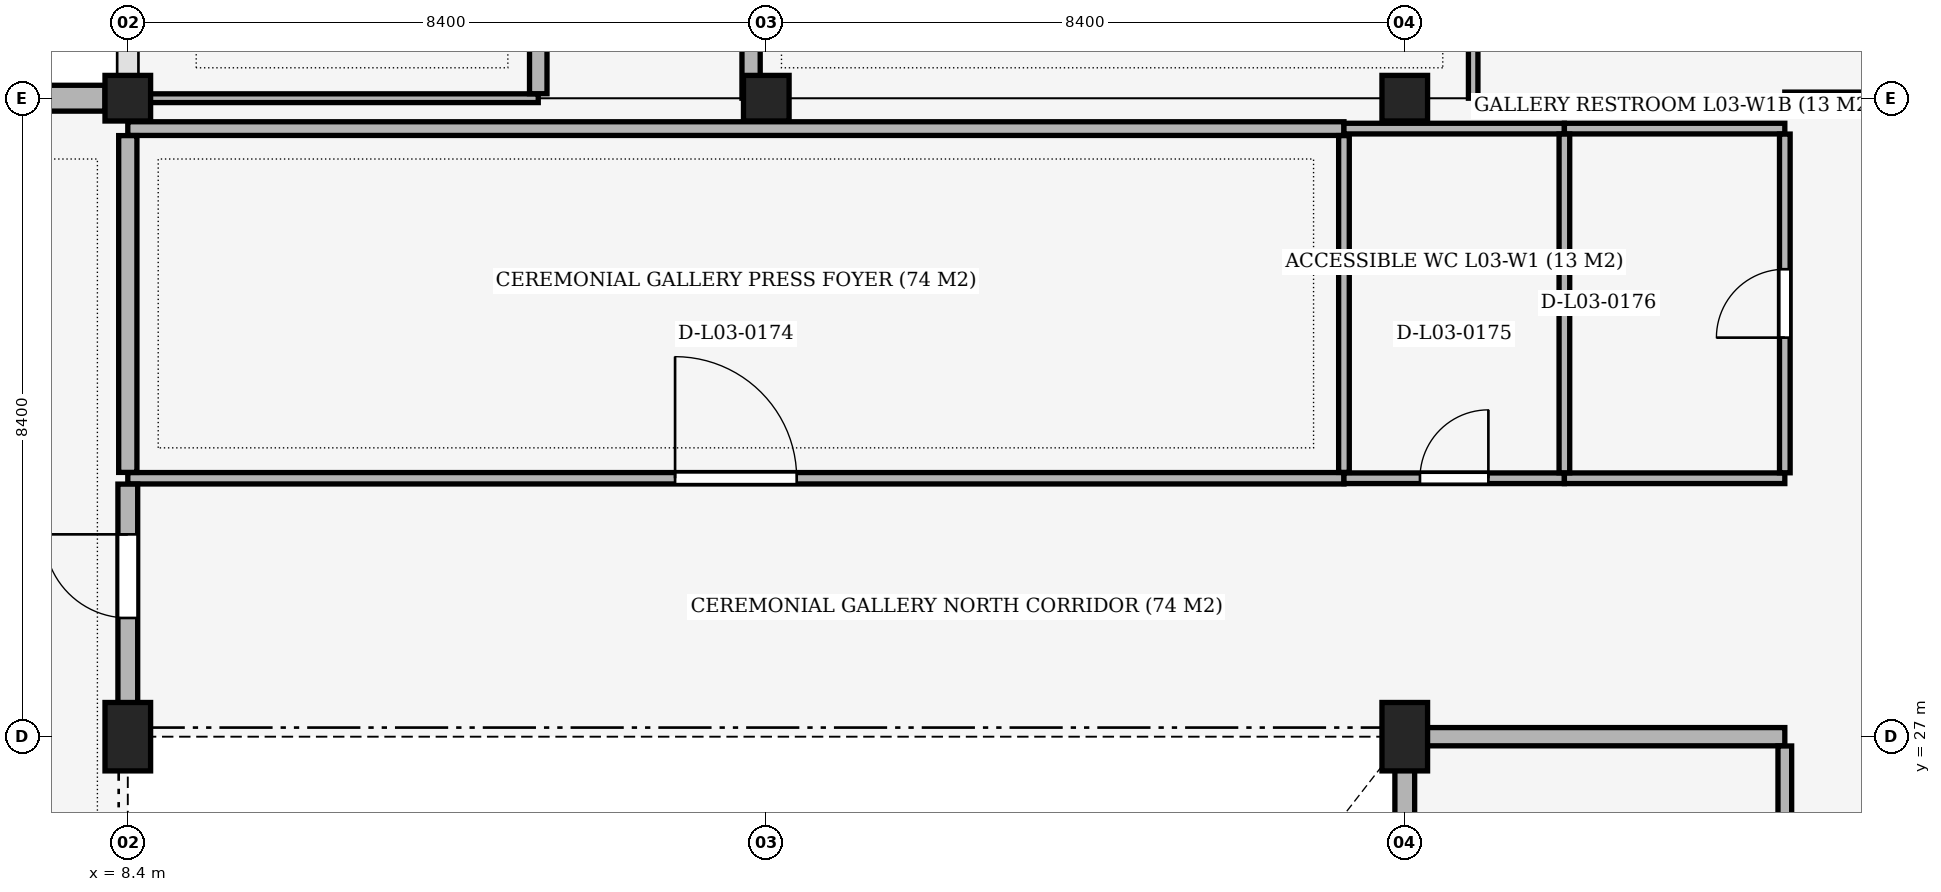
"""IFC4 building model, lengths in metres.
Left out: names, types, materials, properties, quantities, classifications, styles, units other than length and angle.
Written with IfcOpenShell. Run it as: python <this file> out.ifc"""

import sys

from ifc_helpers import new_model, si_unit, direction, frame, frame_2d, origin, origin_2d, place, context, subcontext, project, spatial, rectangle, extrude, element, fill, save


model = new_model("IFC4")
c1 = context("Model", 3, precision=1e-05, world=origin(), true_north=direction((0.0, 1.0)))
c2 = subcontext(c1, "Body", "Model", "MODEL_VIEW")
j1 = project(units=[si_unit("LENGTHUNIT", "METRE"), si_unit("PLANEANGLEUNIT", "RADIAN")], contexts=[c1])
p1 = place(None, origin())
s1 = spatial("IfcSite", under=j1, at=p1, CompositionType="ELEMENT")
p2 = place(p1, origin())
s2 = spatial("IfcBuilding", under=s1, at=p2, CompositionType="ELEMENT")
p3 = place(p2, frame((0.0, 0.0, 15.3)))
s3 = spatial("IfcBuildingStorey", under=s2, at=p3, CompositionType="ELEMENT", Elevation=15.3)
p4 = place(p3, frame((8.4, 27.0, 0.0), z_axis=(0.0, 0.0, 1.0), x_axis=(1.0, 0.0, 0.0)))
e1 = element("IfcColumn", 1, at=p4, inside=s3, PredefinedType="COLUMN", context=c2, shape_type="SweptSolid", body=[
    extrude(rectangle(XDim=0.6, YDim=0.9, at=origin_2d()), origin(), (0.0, 0.0, 1.0), 5.1),
])
for number, where, z_axis, x_axis in (
    (2, (8.4, 35.4, 0.0), (0.0, 0.0, 1.0), (1.0, 0.0, 0.0)),
    (3, (16.8, 35.4, 0.0), (0.0, 0.0, 1.0), (1.0, 0.0, 0.0)),
):
    element("IfcColumn", number, at=place(p3, frame(where, z_axis=z_axis, x_axis=x_axis)), inside=s3, PredefinedType="COLUMN", context=c2, shape_type="SweptSolid", body=[
        extrude(rectangle(XDim=0.6, YDim=0.6, at=origin_2d()), origin(), (0.0, 0.0, 1.0), 5.1),
    ])
p5 = place(p3, frame((25.2, 27.0, 0.0), z_axis=(0.0, 0.0, 1.0), x_axis=(1.0, 0.0, 0.0)))
e4 = element("IfcColumn", 4, at=p5, inside=s3, PredefinedType="COLUMN", context=c2, shape_type="SweptSolid", body=[
    extrude(rectangle(XDim=0.6, YDim=0.9, at=origin_2d()), origin(), (0.0, 0.0, 1.0), 5.1),
])
p6 = place(p3, frame((25.2, 35.4, 0.0), z_axis=(0.0, 0.0, 1.0), x_axis=(1.0, 0.0, 0.0)))
e5 = element("IfcColumn", 5, at=p6, inside=s3, PredefinedType="COLUMN", context=c2, shape_type="SweptSolid", body=[
    extrude(rectangle(XDim=0.6, YDim=0.6, at=origin_2d()), origin(), (0.0, 0.0, 1.0), 5.1),
])
p7 = place(p3, frame((0.3, 35.4, 0.0), z_axis=(0.0, 0.0, 1.0), x_axis=(1.0, 0.0, 0.0)))
e6 = element("IfcWall", 6, at=p7, inside=s3, PredefinedType="SOLIDWALL", context=c2, shape_type="SweptSolid", body=[
    extrude(rectangle(XDim=7.8, YDim=0.34, at=frame_2d((3.9, 0.0))), origin(), (0.0, 0.0, 1.0), 4.14),
])
p8 = place(p7, frame((0.733, 0.0, 0.75)))
e7 = element("IfcOpeningElement", 7, at=p8, cuts=e6, PredefinedType="OPENING", context=c2, shape_type="SweptSolid", body=[
    extrude(rectangle(XDim=2.8, YDim=2.6, at=frame_2d((1.4, 1.3))), frame((0.0, 0.185, 0.0), z_axis=(0.0, -1.0, 0.0), x_axis=(1.0, 0.0, 0.0)), (0.0, 0.0, 1.0), 0.37),
])
p9 = place(p7, frame((4.267, 0.0, 0.75)))
e8 = element("IfcOpeningElement", 8, at=p9, cuts=e6, PredefinedType="OPENING", context=c2, shape_type="SweptSolid", body=[
    extrude(rectangle(XDim=2.8, YDim=2.6, at=frame_2d((1.4, 1.3))), frame((0.0, 0.185, 0.0), z_axis=(0.0, -1.0, 0.0), x_axis=(1.0, 0.0, 0.0)), (0.0, 0.0, 1.0), 0.37),
])
p10 = place(p3, frame((25.2, 27.0, 0.0), z_axis=(0.0, 0.0, 1.0), x_axis=(1.0, 0.0, 0.0)))
e9 = element("IfcWall", 9, at=p10, inside=s3, PredefinedType="PARTITIONING", context=c2, shape_type="SweptSolid", body=[
    extrude(rectangle(XDim=5.0, YDim=0.24, at=frame_2d((2.5, 0.0))), origin(), (0.0, 0.0, 1.0), 3.59),
])
p11 = place(p3, frame((8.4, 30.4, 0.0), z_axis=(0.0, 0.0, 1.0), x_axis=(1.0, 0.0, 0.0)))
e10 = element("IfcWall", 10, at=p11, inside=s3, PredefinedType="PARTITIONING", context=c2, shape_type="SweptSolid", body=[
    extrude(rectangle(XDim=16.0, YDim=0.15, at=frame_2d((8.0, 0.0))), origin(), (0.0, 0.0, 1.0), 4.14),
])
p12 = place(p11, frame((7.2, 0.0, 0.0)))
e11 = element("IfcOpeningElement", 11, at=p12, cuts=e10, PredefinedType="OPENING", context=c2, shape_type="SweptSolid", body=[
    extrude(rectangle(XDim=1.6, YDim=2.3, at=frame_2d((0.8, 1.15))), frame((0.0, 0.09, 0.0), z_axis=(0.0, -1.0, 0.0), x_axis=(1.0, 0.0, 0.0)), (0.0, 0.0, 1.0), 0.18),
])
p13 = place(p3, frame((24.4, 30.4, 0.0), z_axis=(0.0, 0.0, 1.0), x_axis=(1.0, 0.0, 0.0)))
e12 = element("IfcWall", 12, at=p13, inside=s3, PredefinedType="PARTITIONING", context=c2, shape_type="SweptSolid", body=[
    extrude(rectangle(XDim=2.9, YDim=0.14, at=frame_2d((1.45, 0.0))), origin(), (0.0, 0.0, 1.0), 4.14),
])
p14 = place(p13, frame((1.0, 0.0, 0.0)))
e13 = element("IfcOpeningElement", 13, at=p14, cuts=e12, PredefinedType="OPENING", context=c2, shape_type="SweptSolid", body=[
    extrude(rectangle(XDim=0.9, YDim=2.1, at=frame_2d((0.45, 1.05))), frame((0.0, 0.085, 0.0), z_axis=(0.0, -1.0, 0.0), x_axis=(1.0, 0.0, 0.0)), (0.0, 0.0, 1.0), 0.17),
])
p15 = place(p3, frame((27.3, 30.4, 0.0), z_axis=(0.0, 0.0, 1.0), x_axis=(1.0, 0.0, 0.0)))
e14 = element("IfcWall", 14, at=p15, inside=s3, PredefinedType="PARTITIONING", context=c2, shape_type="SweptSolid", body=[
    extrude(rectangle(XDim=2.9, YDim=0.14, at=frame_2d((1.45, 0.0))), origin(), (0.0, 0.0, 1.0), 4.84),
])
p16 = place(p3, frame((8.4, 35.0, 0.0), z_axis=(0.0, 0.0, 1.0), x_axis=(1.0, 0.0, 0.0)))
e15 = element("IfcWall", 15, at=p16, inside=s3, PredefinedType="PARTITIONING", context=c2, shape_type="SweptSolid", body=[
    extrude(rectangle(XDim=16.0, YDim=0.18, at=frame_2d((8.0, 0.0))), origin(), (0.0, 0.0, 1.0), 4.14),
])
p17 = place(p3, frame((24.4, 35.0, 0.0), z_axis=(0.0, 0.0, 1.0), x_axis=(1.0, 0.0, 0.0)))
e16 = element("IfcWall", 16, at=p17, inside=s3, PredefinedType="PARTITIONING", context=c2, shape_type="SweptSolid", body=[
    extrude(rectangle(XDim=2.9, YDim=0.14, at=frame_2d((1.45, 0.0))), origin(), (0.0, 0.0, 1.0), 4.14),
])
p18 = place(p3, frame((27.3, 35.0, 0.0), z_axis=(0.0, 0.0, 1.0), x_axis=(1.0, 0.0, 0.0)))
e17 = element("IfcWall", 17, at=p18, inside=s3, PredefinedType="PARTITIONING", context=c2, shape_type="SweptSolid", body=[
    extrude(rectangle(XDim=2.9, YDim=0.14, at=frame_2d((1.45, 0.0))), origin(), (0.0, 0.0, 1.0), 4.84),
])
p19 = place(p3, frame((30.2, 35.4, 0.0), z_axis=(0.0, 0.0, 1.0), x_axis=(1.0, 0.0, 0.0)))
e18 = element("IfcWall", 18, at=p19, inside=s3, PredefinedType="PARTITIONING", context=c2, shape_type="SweptSolid", body=[
    extrude(rectangle(XDim=3.4, YDim=0.16, at=frame_2d((1.7, 0.0))), origin(), (0.0, 0.0, 1.0), 4.14),
])
p20 = place(p3, frame((8.452, 35.4, 0.0), z_axis=(0.0, 0.0, 1.0), x_axis=(1.0, 0.0, 0.0)))
e19 = element("IfcWall", 19, at=p20, inside=s3, PredefinedType="PARTITIONING", context=c2, shape_type="SweptSolid", body=[
    extrude(rectangle(XDim=5.348, YDim=0.115, at=frame_2d((2.674, 0.0))), origin(), (0.0, 0.0, 1.0), 4.14),
])
p21 = place(p3, frame((8.4, 27.0, 0.0), z_axis=(0.0, 0.0, 1.0), x_axis=(0.0, 1.0, 0.0)))
e20 = element("IfcWall", 20, at=p21, inside=s3, PredefinedType="PARTITIONING", context=c2, shape_type="SweptSolid", body=[
    extrude(rectangle(XDim=3.323, YDim=0.26, at=frame_2d((1.662, 0.0))), origin(), (0.0, 0.0, 1.0), 3.69),
])
p22 = place(p21, frame((1.562, 0.0, 0.0)))
e21 = element("IfcOpeningElement", 21, at=p22, cuts=e20, PredefinedType="OPENING", context=c2, shape_type="SweptSolid", body=[
    extrude(rectangle(XDim=1.1, YDim=2.1, at=frame_2d((0.55, 1.05))), frame((0.0, 0.145, 0.0), z_axis=(0.0, -1.0, 0.0), x_axis=(1.0, 0.0, 0.0)), (0.0, 0.0, 1.0), 0.29),
])
p23 = place(p3, frame((8.4, 30.477, 0.0), z_axis=(0.0, 0.0, 1.0), x_axis=(0.0, 1.0, 0.0)))
e22 = element("IfcWall", 22, at=p23, inside=s3, PredefinedType="PARTITIONING", context=c2, shape_type="SweptSolid", body=[
    extrude(rectangle(XDim=4.431, YDim=0.24, at=frame_2d((2.215, 0.0))), origin(), (0.0, 0.0, 1.0), 4.14),
])
p24 = place(p3, frame((13.8, 35.459, 0.0), z_axis=(0.0, 0.0, 1.0), x_axis=(0.0, 1.0, 0.0)))
e23 = element("IfcWall", 23, at=p24, inside=s3, PredefinedType="SOLIDWALL", context=c2, shape_type="SweptSolid", body=[
    extrude(rectangle(XDim=64.009, YDim=0.23, at=frame_2d((32.004, 0.0))), origin(), (0.0, 0.0, 1.0), 4.14),
])
p25 = place(p24, frame((31.204, 0.0, 0.0)))
e24 = element("IfcOpeningElement", 24, at=p25, cuts=e23, PredefinedType="OPENING", context=c2, shape_type="SweptSolid", body=[
    extrude(rectangle(XDim=1.6, YDim=2.3, at=frame_2d((0.8, 1.15))), frame((0.0, 0.13, 0.0), z_axis=(0.0, -1.0, 0.0), x_axis=(1.0, 0.0, 0.0)), (0.0, 0.0, 1.0), 0.26),
])
p26 = place(p3, frame((16.6, 35.4, 0.0), z_axis=(0.0, 0.0, 1.0), x_axis=(0.0, 1.0, 0.0)))
e25 = element("IfcWall", 25, at=p26, inside=s3, PredefinedType="PARTITIONING", context=c2, shape_type="SweptSolid", body=[
    extrude(rectangle(XDim=10.088, YDim=0.24, at=frame_2d((5.044, 0.0))), origin(), (0.0, 0.0, 1.0), 4.14),
])
p27 = place(p26, frame((2.244, 0.0, 0.0)))
e26 = element("IfcOpeningElement", 26, at=p27, cuts=e25, PredefinedType="OPENING", context=c2, shape_type="SweptSolid", body=[
    extrude(rectangle(XDim=1.6, YDim=2.3, at=frame_2d((0.8, 1.15))), frame((0.0, 0.135, 0.0), z_axis=(0.0, -1.0, 0.0), x_axis=(1.0, 0.0, 0.0)), (0.0, 0.0, 1.0), 0.27),
])
p28 = place(p3, frame((24.4, 30.477, 0.0), z_axis=(0.0, 0.0, 1.0), x_axis=(0.0, 1.0, 0.0)))
e27 = element("IfcWall", 27, at=p28, inside=s3, PredefinedType="PARTITIONING", context=c2, shape_type="SweptSolid", body=[
    extrude(rectangle(XDim=4.431, YDim=0.14, at=frame_2d((2.215, 0.0))), origin(), (0.0, 0.0, 1.0), 4.84),
])
p29 = place(p3, frame((25.2, 5.4, 0.0), z_axis=(0.0, 0.0, 1.0), x_axis=(0.0, 1.0, 0.0)))
e28 = element("IfcWall", 28, at=p29, inside=s3, PredefinedType="PARTITIONING", context=c2, shape_type="SweptSolid", body=[
    extrude(rectangle(XDim=21.478, YDim=0.26, at=frame_2d((10.739, 0.0))), origin(), (0.0, 0.0, 1.0), 3.59),
])
p30 = place(p3, frame((26.1, 35.4, 0.0), z_axis=(0.0, 0.0, 1.0), x_axis=(0.0, 1.0, 0.0)))
e29 = element("IfcWall", 29, at=p30, inside=s3, PredefinedType="PARTITIONING", context=c2, shape_type="SweptSolid", body=[
    extrude(rectangle(XDim=3.698, YDim=0.125, at=frame_2d((1.849, 0.0))), origin(), (0.0, 0.0, 1.0), 4.14),
])
p31 = place(p3, frame((27.3, 30.472, 0.0), z_axis=(0.0, 0.0, 1.0), x_axis=(0.0, 1.0, 0.0)))
e30 = element("IfcWall", 30, at=p31, inside=s3, PredefinedType="PARTITIONING", context=c2, shape_type="SweptSolid", body=[
    extrude(rectangle(XDim=4.456, YDim=0.14, at=frame_2d((2.228, 0.0))), origin(), (0.0, 0.0, 1.0), 4.54),
])
p32 = place(p3, frame((30.2, 0.172, 0.0), z_axis=(0.0, 0.0, 1.0), x_axis=(0.0, 1.0, 0.0)))
e31 = element("IfcWall", 31, at=p32, inside=s3, PredefinedType="PARTITIONING", context=c2, shape_type="SweptSolid", body=[
    extrude(rectangle(XDim=26.706, YDim=0.18, at=frame_2d((13.353, 0.0))), origin(), (0.0, 0.0, 1.0), 4.14),
])
p33 = place(p32, frame((12.878, 0.0, 0.0)))
e32 = element("IfcOpeningElement", 32, at=p33, cuts=e31, PredefinedType="OPENING", context=c2, shape_type="SweptSolid", body=[
    extrude(rectangle(XDim=0.95, YDim=2.1, at=frame_2d((0.475, 1.05))), frame((0.0, 0.105, 0.0), z_axis=(0.0, -1.0, 0.0), x_axis=(1.0, 0.0, 0.0)), (0.0, 0.0, 1.0), 0.21),
])
p34 = place(p3, frame((30.2, 30.472, 0.0), z_axis=(0.0, 0.0, 1.0), x_axis=(0.0, 1.0, 0.0)))
e33 = element("IfcWall", 33, at=p34, inside=s3, PredefinedType="PARTITIONING", context=c2, shape_type="SweptSolid", body=[
    extrude(rectangle(XDim=4.456, YDim=0.14, at=frame_2d((2.228, 0.0))), origin(), (0.0, 0.0, 1.0), 4.54),
])
p35 = place(p34, frame((1.778, 0.0, 0.0)))
e34 = element("IfcOpeningElement", 34, at=p35, cuts=e33, PredefinedType="OPENING", context=c2, shape_type="SweptSolid", body=[
    extrude(rectangle(XDim=0.9, YDim=2.1, at=frame_2d((0.45, 1.05))), frame((0.0, 0.085, 0.0), z_axis=(0.0, -1.0, 0.0), x_axis=(1.0, 0.0, 0.0)), (0.0, 0.0, 1.0), 0.17),
])
p36 = place(p22, origin())
e35 = element("IfcDoor", 35, at=p36, inside=s3, OperationType="SINGLE_SWING_RIGHT", PredefinedType="DOOR", context=c2, shape_type="SweptSolid", body=[
    extrude(rectangle(XDim=1.1, YDim=2.1, at=frame_2d((0.55, 1.05))), frame((0.0, 0.025, 0.0), z_axis=(0.0, -1.0, 0.0), x_axis=(1.0, 0.0, 0.0)), (0.0, 0.0, 1.0), 0.05),
])
fill(e21, e35)
p37 = place(p12, origin())
e36 = element("IfcDoor", 36, at=p37, inside=s3, OperationType="SINGLE_SWING_LEFT", PredefinedType="DOOR", context=c2, shape_type="SweptSolid", body=[
    extrude(rectangle(XDim=1.6, YDim=2.3, at=frame_2d((0.8, 1.15))), frame((0.0, 0.025, 0.0), z_axis=(0.0, -1.0, 0.0), x_axis=(1.0, 0.0, 0.0)), (0.0, 0.0, 1.0), 0.05),
])
fill(e11, e36)
p38 = place(p14, origin())
e37 = element("IfcDoor", 37, at=p38, inside=s3, OperationType="SINGLE_SWING_RIGHT", PredefinedType="DOOR", context=c2, shape_type="SweptSolid", body=[
    extrude(rectangle(XDim=0.9, YDim=2.1, at=frame_2d((0.45, 1.05))), frame((0.0, 0.025, 0.0), z_axis=(0.0, -1.0, 0.0), x_axis=(1.0, 0.0, 0.0)), (0.0, 0.0, 1.0), 0.05),
])
fill(e13, e37)
p39 = place(p35, origin())
e38 = element("IfcDoor", 38, at=p39, inside=s3, OperationType="SINGLE_SWING_LEFT", PredefinedType="DOOR", context=c2, shape_type="SweptSolid", body=[
    extrude(rectangle(XDim=0.9, YDim=2.1, at=frame_2d((0.45, 1.05))), frame((0.0, 0.025, 0.0), z_axis=(0.0, -1.0, 0.0), x_axis=(1.0, 0.0, 0.0)), (0.0, 0.0, 1.0), 0.05),
])
fill(e34, e38)
save(model, sys.argv[1])
